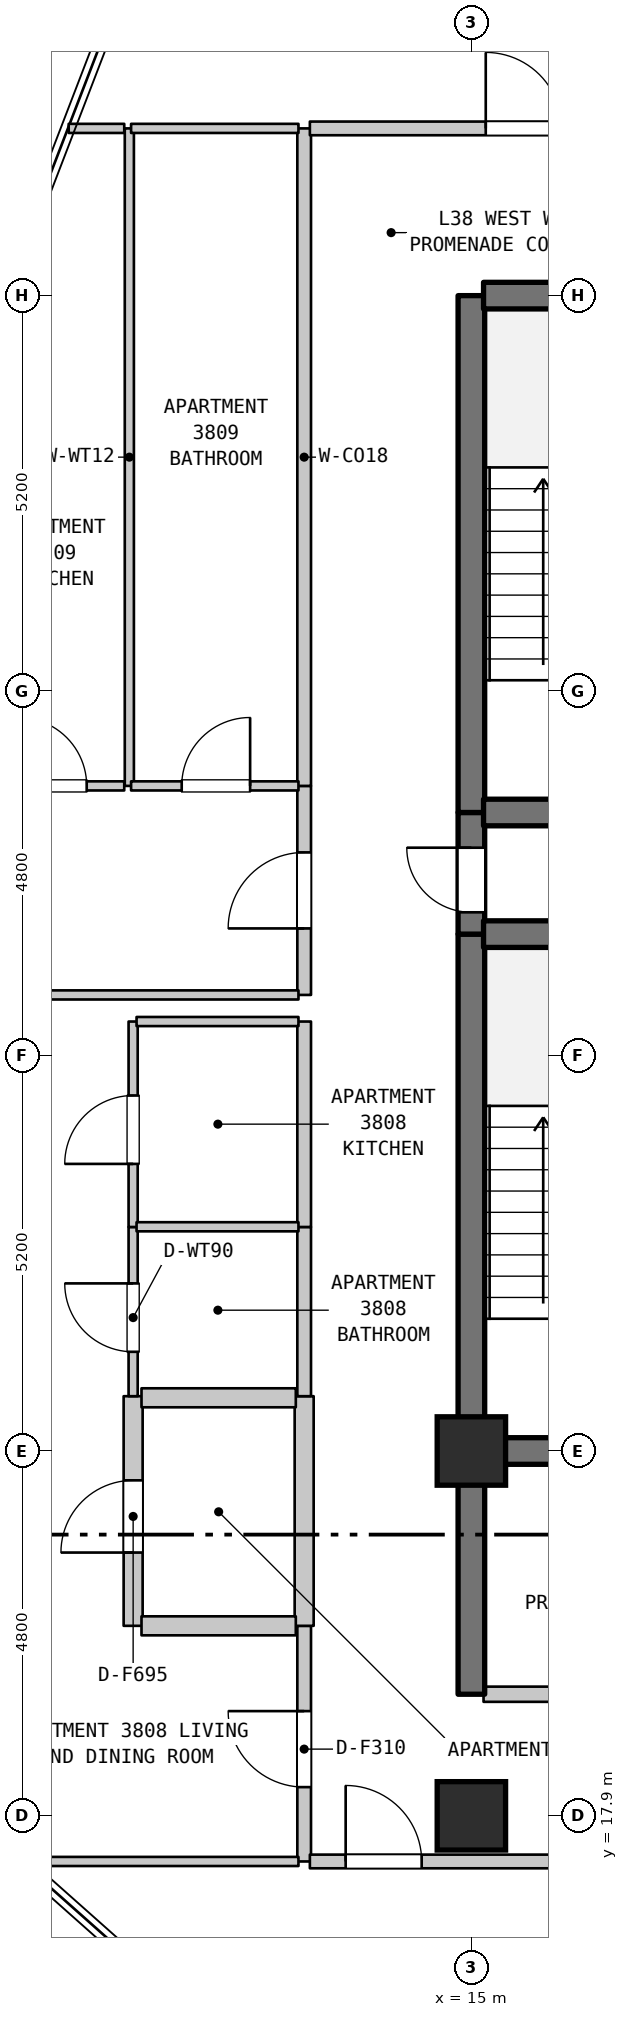
"""IFC4 building model, lengths in metres.
Left out: names, types, materials, properties, quantities, classifications, styles, units other than length and angle.
Written with IfcOpenShell. Run it as: python <this file> out.ifc"""

import sys

from ifc_helpers import new_model, si_unit, direction, frame, frame_2d, origin, origin_2d, place, context, subcontext, project, spatial, rectangle, extrude, element, fill, save


model = new_model("IFC4")
c1 = context("Model", 3, precision=1e-05, world=origin(), true_north=direction((0.0, 1.0)))
c2 = subcontext(c1, "Body", "Model", "MODEL_VIEW")
j1 = project(units=[si_unit("LENGTHUNIT", "METRE"), si_unit("PLANEANGLEUNIT", "RADIAN")], contexts=[c1])
p1 = place(None, origin())
s1 = spatial("IfcSite", under=j1, at=p1, CompositionType="ELEMENT")
p2 = place(p1, origin())
s2 = spatial("IfcBuilding", under=s1, at=p2, CompositionType="ELEMENT")
p3 = place(p2, frame((0.0, 0.0, 155.7)))
s3 = spatial("IfcBuildingStorey", under=s2, at=p3, CompositionType="ELEMENT", Elevation=155.7)
for number, where, z_axis, x_axis in (
    (1, (15.0, 17.9, 0.0), (0.0, 0.0, 1.0), (1.0, 0.0, 0.0)),
    (2, (15.0, 22.7, 0.0), (0.0, 0.0, 1.0), (1.0, 0.0, 0.0)),
):
    element("IfcColumn", number, at=place(p3, frame(where, z_axis=z_axis, x_axis=x_axis)), inside=s3, PredefinedType="COLUMN", context=c2, shape_type="SweptSolid", body=[
        extrude(rectangle(XDim=0.9, YDim=0.9, at=origin_2d()), origin(), (0.0, 0.0, 1.0), 3.7),
    ])
p4 = place(p3, frame((10.5, 31.45, 0.0), z_axis=(0.0, 0.0, 1.0), x_axis=(0.0, 1.0, 0.0)))
e3 = element("IfcWall", 3, at=p4, inside=s3, PredefinedType="PARTITIONING", context=c2, shape_type="SweptSolid", body=[
    extrude(rectangle(XDim=8.65, YDim=0.12, at=frame_2d((4.325, 0.0))), origin(), (0.0, 0.0, 1.0), 3.28),
])
p5 = place(p3, frame((10.55, 20.4, 0.0), z_axis=(0.0, 0.0, 1.0), x_axis=(0.0, 1.0, 0.0)))
e4 = element("IfcWall", 4, at=p5, inside=s3, PredefinedType="STANDARD", context=c2, shape_type="SweptSolid", body=[
    extrude(rectangle(XDim=3.021, YDim=0.25, at=frame_2d((1.51, 0.0))), origin(), (0.0, 0.0, 1.0), 3.28),
])
p6 = place(p5, frame((0.964, 0.0, 0.0)))
e5 = element("IfcOpeningElement", 5, at=p6, cuts=e4, PredefinedType="OPENING", context=c2, shape_type="SweptSolid", body=[
    extrude(rectangle(XDim=0.95, YDim=2.15, at=frame_2d((0.475, 1.075))), frame((0.0, 0.135, 0.0), z_axis=(0.0, -1.0, 0.0), x_axis=(1.0, 0.0, 0.0)), (0.0, 0.0, 1.0), 0.27),
])
p7 = place(p3, frame((10.55, 23.421, 0.0), z_axis=(0.0, 0.0, 1.0), x_axis=(0.0, 1.0, 0.0)))
e6 = element("IfcWall", 6, at=p7, inside=s3, PredefinedType="PARTITIONING", context=c2, shape_type="SweptSolid", body=[
    extrude(rectangle(XDim=2.226, YDim=0.12, at=frame_2d((1.113, 0.0))), origin(), (0.0, 0.0, 1.0), 3.28),
])
p8 = place(p7, frame((0.584, 0.0, 0.0)))
e7 = element("IfcOpeningElement", 7, at=p8, cuts=e6, PredefinedType="OPENING", context=c2, shape_type="SweptSolid", body=[
    extrude(rectangle(XDim=0.9, YDim=2.1, at=frame_2d((0.45, 1.05))), frame((0.0, 0.07, 0.0), z_axis=(0.0, -1.0, 0.0), x_axis=(1.0, 0.0, 0.0)), (0.0, 0.0, 1.0), 0.14),
])
p9 = place(p3, frame((10.55, 25.647, 0.0), z_axis=(0.0, 0.0, 1.0), x_axis=(0.0, 1.0, 0.0)))
e8 = element("IfcWall", 8, at=p9, inside=s3, PredefinedType="PARTITIONING", context=c2, shape_type="SweptSolid", body=[
    extrude(rectangle(XDim=2.703, YDim=0.12, at=frame_2d((1.352, 0.0))), origin(), (0.0, 0.0, 1.0), 3.28),
])
p10 = place(p9, frame((0.83, 0.0, 0.0)))
e9 = element("IfcOpeningElement", 9, at=p10, cuts=e8, PredefinedType="OPENING", context=c2, shape_type="SweptSolid", body=[
    extrude(rectangle(XDim=0.9, YDim=2.15, at=frame_2d((0.45, 1.075))), frame((0.0, 0.07, 0.0), z_axis=(0.0, -1.0, 0.0), x_axis=(1.0, 0.0, 0.0)), (0.0, 0.0, 1.0), 0.14),
])
p11 = place(p3, frame((12.8, 17.3, 0.0), z_axis=(0.0, 0.0, 1.0), x_axis=(0.0, 1.0, 0.0)))
e10 = element("IfcWall", 10, at=p11, inside=s3, PredefinedType="STANDARD", context=c2, shape_type="SweptSolid", body=[
    extrude(rectangle(XDim=3.1, YDim=0.18, at=frame_2d((1.55, 0.0))), origin(), (0.0, 0.0, 1.0), 3.28),
])
p12 = place(p11, frame((0.978, 0.0, 0.0)))
e11 = element("IfcOpeningElement", 11, at=p12, cuts=e10, PredefinedType="OPENING", context=c2, shape_type="SweptSolid", body=[
    extrude(rectangle(XDim=1.0, YDim=2.15, at=frame_2d((0.5, 1.075))), frame((0.0, 0.1, 0.0), z_axis=(0.0, -1.0, 0.0), x_axis=(1.0, 0.0, 0.0)), (0.0, 0.0, 1.0), 0.2),
])
p13 = place(p3, frame((12.8, 20.4, 0.0), z_axis=(0.0, 0.0, 1.0), x_axis=(0.0, 1.0, 0.0)))
e12 = element("IfcWall", 12, at=p13, inside=s3, PredefinedType="STANDARD", context=c2, shape_type="SweptSolid", body=[
    extrude(rectangle(XDim=3.021, YDim=0.25, at=frame_2d((1.51, 0.0))), origin(), (0.0, 0.0, 1.0), 3.28),
])
p14 = place(p3, frame((12.8, 23.421, 0.0), z_axis=(0.0, 0.0, 1.0), x_axis=(0.0, 1.0, 0.0)))
e13 = element("IfcWall", 13, at=p14, inside=s3, PredefinedType="STANDARD", context=c2, shape_type="SweptSolid", body=[
    extrude(rectangle(XDim=2.226, YDim=0.18, at=frame_2d((1.113, 0.0))), origin(), (0.0, 0.0, 1.0), 3.28),
])
p15 = place(p3, frame((12.8, 25.647, 0.0), z_axis=(0.0, 0.0, 1.0), x_axis=(0.0, 1.0, 0.0)))
e14 = element("IfcWall", 14, at=p15, inside=s3, PredefinedType="STANDARD", context=c2, shape_type="SweptSolid", body=[
    extrude(rectangle(XDim=2.703, YDim=0.18, at=frame_2d((1.352, 0.0))), origin(), (0.0, 0.0, 1.0), 3.28),
])
p16 = place(p3, frame((12.8, 28.7, 0.0), z_axis=(0.0, 0.0, 1.0), x_axis=(0.0, 1.0, 0.0)))
e15 = element("IfcWall", 15, at=p16, inside=s3, PredefinedType="STANDARD", context=c2, shape_type="SweptSolid", body=[
    extrude(rectangle(XDim=2.75, YDim=0.18, at=frame_2d((1.375, 0.0))), origin(), (0.0, 0.0, 1.0), 3.28),
])
p17 = place(p16, frame((0.875, 0.0, 0.0)))
e16 = element("IfcOpeningElement", 16, at=p17, cuts=e15, PredefinedType="OPENING", context=c2, shape_type="SweptSolid", body=[
    extrude(rectangle(XDim=1.0, YDim=2.15, at=frame_2d((0.5, 1.075))), frame((0.0, 0.1, 0.0), z_axis=(0.0, -1.0, 0.0), x_axis=(1.0, 0.0, 0.0)), (0.0, 0.0, 1.0), 0.2),
])
p18 = place(p3, frame((12.8, 31.45, 0.0), z_axis=(0.0, 0.0, 1.0), x_axis=(0.0, 1.0, 0.0)))
e17 = element("IfcWall", 17, at=p18, inside=s3, PredefinedType="STANDARD", context=c2, shape_type="SweptSolid", body=[
    extrude(rectangle(XDim=8.65, YDim=0.18, at=frame_2d((4.325, 0.0))), origin(), (0.0, 0.0, 1.0), 3.28),
])
p19 = place(p3, frame((15.0, 19.5, 0.0), z_axis=(0.0, 0.0, 1.0), x_axis=(0.0, 1.0, 0.0)))
e18 = element("IfcWall", 18, at=p19, inside=s3, PredefinedType="SHEAR", context=c2, shape_type="SweptSolid", body=[
    extrude(rectangle(XDim=3.2, YDim=0.35, at=frame_2d((1.6, 0.0))), origin(), (0.0, 0.0, 1.0), 3.28),
])
p20 = place(p3, frame((15.0, 22.7, 0.0), z_axis=(0.0, 0.0, 1.0), x_axis=(0.0, 1.0, 0.0)))
e19 = element("IfcWall", 19, at=p20, inside=s3, PredefinedType="SHEAR", context=c2, shape_type="SweptSolid", body=[
    extrude(rectangle(XDim=6.8, YDim=0.35, at=frame_2d((3.4, 0.0))), origin(), (0.0, 0.0, 1.0), 3.28),
])
p21 = place(p3, frame((15.0, 29.5, 0.0), z_axis=(0.0, 0.0, 1.0), x_axis=(0.0, 1.0, 0.0)))
e20 = element("IfcWall", 20, at=p21, inside=s3, PredefinedType="SHEAR", context=c2, shape_type="SweptSolid", body=[
    extrude(rectangle(XDim=1.6, YDim=0.35, at=frame_2d((0.8, 0.0))), origin(), (0.0, 0.0, 1.0), 3.28),
])
p22 = place(p21, frame((0.287, 0.0, 0.0)))
e21 = element("IfcOpeningElement", 21, at=p22, cuts=e20, PredefinedType="OPENING", context=c2, shape_type="SweptSolid", body=[
    extrude(rectangle(XDim=0.85, YDim=2.1, at=frame_2d((0.425, 1.05))), frame((0.0, 0.185, 0.0), z_axis=(0.0, -1.0, 0.0), x_axis=(1.0, 0.0, 0.0)), (0.0, 0.0, 1.0), 0.37),
])
p23 = place(p3, frame((15.0, 31.1, 0.0), z_axis=(0.0, 0.0, 1.0), x_axis=(0.0, 1.0, 0.0)))
e22 = element("IfcWall", 22, at=p23, inside=s3, PredefinedType="SHEAR", context=c2, shape_type="SweptSolid", body=[
    extrude(rectangle(XDim=6.8, YDim=0.35, at=frame_2d((3.4, 0.0))), origin(), (0.0, 0.0, 1.0), 3.28),
])
p24 = place(p3, frame((9.085, 17.3, 0.0), z_axis=(0.0, 0.0, 1.0), x_axis=(1.0, 0.0, 0.0)))
e23 = element("IfcWall", 23, at=p24, inside=s3, PredefinedType="PARTITIONING", context=c2, shape_type="SweptSolid", body=[
    extrude(rectangle(XDim=3.64, YDim=0.12, at=frame_2d((1.82, 0.0))), origin(), (0.0, 0.0, 1.0), 3.28),
])
p25 = place(p3, frame((12.875, 17.3, 0.0), z_axis=(0.0, 0.0, 1.0), x_axis=(1.0, 0.0, 0.0)))
e24 = element("IfcWall", 24, at=p25, inside=s3, PredefinedType="STANDARD", context=c2, shape_type="SweptSolid", body=[
    extrude(rectangle(XDim=3.28, YDim=0.18, at=frame_2d((1.64, 0.0))), origin(), (0.0, 0.0, 1.0), 3.28),
])
p26 = place(p25, frame((0.471, 0.0, 0.0)))
e25 = element("IfcOpeningElement", 25, at=p26, cuts=e24, PredefinedType="OPENING", context=c2, shape_type="SweptSolid", body=[
    extrude(rectangle(XDim=1.0, YDim=2.15, at=frame_2d((0.5, 1.075))), frame((0.0, 0.1, 0.0), z_axis=(0.0, -1.0, 0.0), x_axis=(1.0, 0.0, 0.0)), (0.0, 0.0, 1.0), 0.2),
])
p27 = place(p3, frame((15.16, 19.5, 0.0), z_axis=(0.0, 0.0, 1.0), x_axis=(1.0, 0.0, 0.0)))
e26 = element("IfcWall", 26, at=p27, inside=s3, PredefinedType="STANDARD", context=c2, shape_type="SweptSolid", body=[
    extrude(rectangle(XDim=3.68, YDim=0.2, at=frame_2d((1.84, 0.0))), origin(), (0.0, 0.0, 1.0), 3.28),
])
p28 = place(p27, frame((1.39, 0.0, 0.0)))
e27 = element("IfcOpeningElement", 27, at=p28, cuts=e26, PredefinedType="OPENING", context=c2, shape_type="SweptSolid", body=[
    extrude(rectangle(XDim=0.9, YDim=2.15, at=frame_2d((0.45, 1.075))), frame((0.0, 0.11, 0.0), z_axis=(0.0, -1.0, 0.0), x_axis=(1.0, 0.0, 0.0)), (0.0, 0.0, 1.0), 0.22),
])
p29 = place(p3, frame((10.66, 20.4, 0.0), z_axis=(0.0, 0.0, 1.0), x_axis=(1.0, 0.0, 0.0)))
e28 = element("IfcWall", 28, at=p29, inside=s3, PredefinedType="STANDARD", context=c2, shape_type="SweptSolid", body=[
    extrude(rectangle(XDim=2.03, YDim=0.25, at=frame_2d((1.015, 0.0))), origin(), (0.0, 0.0, 1.0), 3.28),
])
p30 = place(p3, frame((15.16, 22.7, 0.0), z_axis=(0.0, 0.0, 1.0), x_axis=(1.0, 0.0, 0.0)))
e29 = element("IfcWall", 29, at=p30, inside=s3, PredefinedType="SHEAR", context=c2, shape_type="SweptSolid", body=[
    extrude(rectangle(XDim=3.68, YDim=0.35, at=frame_2d((1.84, 0.0))), origin(), (0.0, 0.0, 1.0), 3.28),
])
p31 = place(p3, frame((10.66, 23.4, 0.0), z_axis=(0.0, 0.0, 1.0), x_axis=(1.0, 0.0, 0.0)))
e30 = element("IfcWall", 30, at=p31, inside=s3, PredefinedType="STANDARD", context=c2, shape_type="SweptSolid", body=[
    extrude(rectangle(XDim=2.03, YDim=0.25, at=frame_2d((1.015, 0.0))), origin(), (0.0, 0.0, 1.0), 3.28),
])
for number, where, z_axis, x_axis in (
    (31, (10.595, 25.65, 0.0), (0.0, 0.0, 1.0), (1.0, 0.0, 0.0)),
    (32, (10.595, 28.35, 0.0), (0.0, 0.0, 1.0), (1.0, 0.0, 0.0)),
):
    element("IfcWall", number, at=place(p3, frame(where, z_axis=z_axis, x_axis=x_axis)), inside=s3, PredefinedType="PARTITIONING", context=c2, shape_type="SweptSolid", body=[
        extrude(rectangle(XDim=2.13, YDim=0.12, at=frame_2d((1.065, 0.0))), origin(), (0.0, 0.0, 1.0), 3.28),
    ])
p32 = place(p3, frame((9.03, 28.7, 0.0), z_axis=(0.0, 0.0, 1.0), x_axis=(1.0, 0.0, 0.0)))
e33 = element("IfcWall", 33, at=p32, inside=s3, PredefinedType="PARTITIONING", context=c2, shape_type="SweptSolid", body=[
    extrude(rectangle(XDim=3.695, YDim=0.12, at=frame_2d((1.848, 0.0))), origin(), (0.0, 0.0, 1.0), 3.28),
])
for number, where, z_axis, x_axis in (
    (34, (15.16, 29.5, 0.0), (0.0, 0.0, 1.0), (1.0, 0.0, 0.0)),
    (35, (15.16, 31.1, 0.0), (0.0, 0.0, 1.0), (1.0, 0.0, 0.0)),
):
    element("IfcWall", number, at=place(p3, frame(where, z_axis=z_axis, x_axis=x_axis)), inside=s3, PredefinedType="SHEAR", context=c2, shape_type="SweptSolid", body=[
        extrude(rectangle(XDim=3.68, YDim=0.35, at=frame_2d((1.84, 0.0))), origin(), (0.0, 0.0, 1.0), 3.28),
    ])
p33 = place(p3, frame((8.545, 31.45, 0.0), z_axis=(0.0, 0.0, 1.0), x_axis=(1.0, 0.0, 0.0)))
e36 = element("IfcWall", 36, at=p33, inside=s3, PredefinedType="PARTITIONING", context=c2, shape_type="SweptSolid", body=[
    extrude(rectangle(XDim=1.888, YDim=0.12, at=frame_2d((0.944, 0.0))), origin(), (0.0, 0.0, 1.0), 3.28),
])
p34 = place(p33, frame((0.494, 0.0, 0.0)))
e37 = element("IfcOpeningElement", 37, at=p34, cuts=e36, PredefinedType="OPENING", context=c2, shape_type="SweptSolid", body=[
    extrude(rectangle(XDim=0.9, YDim=2.15, at=frame_2d((0.45, 1.075))), frame((0.0, 0.07, 0.0), z_axis=(0.0, -1.0, 0.0), x_axis=(1.0, 0.0, 0.0)), (0.0, 0.0, 1.0), 0.14),
])
p35 = place(p3, frame((10.523, 31.45, 0.0), z_axis=(0.0, 0.0, 1.0), x_axis=(1.0, 0.0, 0.0)))
e38 = element("IfcWall", 38, at=p35, inside=s3, PredefinedType="PARTITIONING", context=c2, shape_type="SweptSolid", body=[
    extrude(rectangle(XDim=2.202, YDim=0.12, at=frame_2d((1.101, 0.0))), origin(), (0.0, 0.0, 1.0), 3.28),
])
p36 = place(p35, frame((0.666, 0.0, 0.0)))
e39 = element("IfcOpeningElement", 39, at=p36, cuts=e38, PredefinedType="OPENING", context=c2, shape_type="SweptSolid", body=[
    extrude(rectangle(XDim=0.9, YDim=2.1, at=frame_2d((0.45, 1.05))), frame((0.0, 0.07, 0.0), z_axis=(0.0, -1.0, 0.0), x_axis=(1.0, 0.0, 0.0)), (0.0, 0.0, 1.0), 0.14),
])
p37 = place(p3, frame((15.16, 37.9, 0.0), z_axis=(0.0, 0.0, 1.0), x_axis=(1.0, 0.0, 0.0)))
e40 = element("IfcWall", 40, at=p37, inside=s3, PredefinedType="SHEAR", context=c2, shape_type="SweptSolid", body=[
    extrude(rectangle(XDim=3.68, YDim=0.35, at=frame_2d((1.84, 0.0))), origin(), (0.0, 0.0, 1.0), 3.28),
])
p38 = place(p3, frame((9.702, 40.1, 0.0), z_axis=(0.0, 0.0, 1.0), x_axis=(1.0, 0.0, 0.0)))
e41 = element("IfcWall", 41, at=p38, inside=s3, PredefinedType="PARTITIONING", context=c2, shape_type="SweptSolid", body=[
    extrude(rectangle(XDim=0.731, YDim=0.12, at=frame_2d((0.366, 0.0))), origin(), (0.0, 0.0, 1.0), 3.28),
])
p39 = place(p3, frame((10.523, 40.1, 0.0), z_axis=(0.0, 0.0, 1.0), x_axis=(1.0, 0.0, 0.0)))
e42 = element("IfcWall", 42, at=p39, inside=s3, PredefinedType="PARTITIONING", context=c2, shape_type="SweptSolid", body=[
    extrude(rectangle(XDim=2.202, YDim=0.12, at=frame_2d((1.101, 0.0))), origin(), (0.0, 0.0, 1.0), 3.28),
])
p40 = place(p3, frame((12.875, 40.1, 0.0), z_axis=(0.0, 0.0, 1.0), x_axis=(1.0, 0.0, 0.0)))
e43 = element("IfcWall", 43, at=p40, inside=s3, PredefinedType="STANDARD", context=c2, shape_type="SweptSolid", body=[
    extrude(rectangle(XDim=5.8, YDim=0.18, at=frame_2d((2.9, 0.0))), origin(), (0.0, 0.0, 1.0), 3.28),
])
p41 = place(p40, frame((2.314, 0.0, 0.0)))
e44 = element("IfcOpeningElement", 44, at=p41, cuts=e43, PredefinedType="OPENING", context=c2, shape_type="SweptSolid", body=[
    extrude(rectangle(XDim=1.0, YDim=2.15, at=frame_2d((0.5, 1.075))), frame((0.0, 0.1, 0.0), z_axis=(0.0, -1.0, 0.0), x_axis=(1.0, 0.0, 0.0)), (0.0, 0.0, 1.0), 0.2),
])
p42 = place(p6, origin())
e45 = element("IfcDoor", 45, at=p42, inside=s3, OperationType="SINGLE_SWING_LEFT", PredefinedType="DOOR", context=c2, shape_type="SweptSolid", body=[
    extrude(rectangle(XDim=0.95, YDim=2.15, at=frame_2d((0.475, 1.075))), frame((0.0, 0.025, 0.0), z_axis=(0.0, -1.0, 0.0), x_axis=(1.0, 0.0, 0.0)), (0.0, 0.0, 1.0), 0.05),
])
fill(e5, e45)
p43 = place(p8, origin())
e46 = element("IfcDoor", 46, at=p43, inside=s3, OperationType="SINGLE_SWING_RIGHT", PredefinedType="DOOR", context=c2, shape_type="SweptSolid", body=[
    extrude(rectangle(XDim=0.9, YDim=2.1, at=frame_2d((0.45, 1.05))), frame((0.0, 0.025, 0.0), z_axis=(0.0, -1.0, 0.0), x_axis=(1.0, 0.0, 0.0)), (0.0, 0.0, 1.0), 0.05),
])
fill(e7, e46)
p44 = place(p10, origin())
e47 = element("IfcDoor", 47, at=p44, inside=s3, OperationType="SINGLE_SWING_LEFT", PredefinedType="DOOR", context=c2, shape_type="SweptSolid", body=[
    extrude(rectangle(XDim=0.9, YDim=2.15, at=frame_2d((0.45, 1.075))), frame((0.0, 0.025, 0.0), z_axis=(0.0, -1.0, 0.0), x_axis=(1.0, 0.0, 0.0)), (0.0, 0.0, 1.0), 0.05),
])
fill(e9, e47)
p45 = place(p12, origin())
e48 = element("IfcDoor", 48, at=p45, inside=s3, OperationType="SINGLE_SWING_RIGHT", PredefinedType="DOOR", context=c2, shape_type="SweptSolid", body=[
    extrude(rectangle(XDim=1.0, YDim=2.15, at=frame_2d((0.5, 1.075))), frame((0.0, 0.025, 0.0), z_axis=(0.0, -1.0, 0.0), x_axis=(1.0, 0.0, 0.0)), (0.0, 0.0, 1.0), 0.05),
])
fill(e11, e48)
p46 = place(p17, origin())
e49 = element("IfcDoor", 49, at=p46, inside=s3, OperationType="SINGLE_SWING_LEFT", PredefinedType="DOOR", context=c2, shape_type="SweptSolid", body=[
    extrude(rectangle(XDim=1.0, YDim=2.15, at=frame_2d((0.5, 1.075))), frame((0.0, 0.025, 0.0), z_axis=(0.0, -1.0, 0.0), x_axis=(1.0, 0.0, 0.0)), (0.0, 0.0, 1.0), 0.05),
])
fill(e16, e49)
p47 = place(p22, origin())
e50 = element("IfcDoor", 50, at=p47, inside=s3, OperationType="SINGLE_SWING_RIGHT", PredefinedType="DOOR", context=c2, shape_type="SweptSolid", body=[
    extrude(rectangle(XDim=0.85, YDim=2.1, at=frame_2d((0.425, 1.05))), frame((0.0, 0.025, 0.0), z_axis=(0.0, -1.0, 0.0), x_axis=(1.0, 0.0, 0.0)), (0.0, 0.0, 1.0), 0.05),
])
fill(e21, e50)
p48 = place(p26, origin())
e51 = element("IfcDoor", 51, at=p48, inside=s3, OperationType="SINGLE_SWING_LEFT", PredefinedType="DOOR", context=c2, shape_type="SweptSolid", body=[
    extrude(rectangle(XDim=1.0, YDim=2.15, at=frame_2d((0.5, 1.075))), frame((0.0, 0.025, 0.0), z_axis=(0.0, -1.0, 0.0), x_axis=(1.0, 0.0, 0.0)), (0.0, 0.0, 1.0), 0.05),
])
fill(e25, e51)
p49 = place(p34, origin())
e52 = element("IfcDoor", 52, at=p49, inside=s3, OperationType="SINGLE_SWING_LEFT", PredefinedType="DOOR", context=c2, shape_type="SweptSolid", body=[
    extrude(rectangle(XDim=0.9, YDim=2.15, at=frame_2d((0.45, 1.075))), frame((0.0, 0.025, 0.0), z_axis=(0.0, -1.0, 0.0), x_axis=(1.0, 0.0, 0.0)), (0.0, 0.0, 1.0), 0.05),
])
fill(e37, e52)
p50 = place(p36, origin())
e53 = element("IfcDoor", 53, at=p50, inside=s3, OperationType="SINGLE_SWING_RIGHT", PredefinedType="DOOR", context=c2, shape_type="SweptSolid", body=[
    extrude(rectangle(XDim=0.9, YDim=2.1, at=frame_2d((0.45, 1.05))), frame((0.0, 0.025, 0.0), z_axis=(0.0, -1.0, 0.0), x_axis=(1.0, 0.0, 0.0)), (0.0, 0.0, 1.0), 0.05),
])
fill(e39, e53)
p51 = place(p41, origin())
e54 = element("IfcDoor", 54, at=p51, inside=s3, OperationType="SINGLE_SWING_LEFT", PredefinedType="DOOR", context=c2, shape_type="SweptSolid", body=[
    extrude(rectangle(XDim=1.0, YDim=2.15, at=frame_2d((0.5, 1.075))), frame((0.0, 0.025, 0.0), z_axis=(0.0, -1.0, 0.0), x_axis=(1.0, 0.0, 0.0)), (0.0, 0.0, 1.0), 0.05),
])
fill(e44, e54)
save(model, sys.argv[1])
